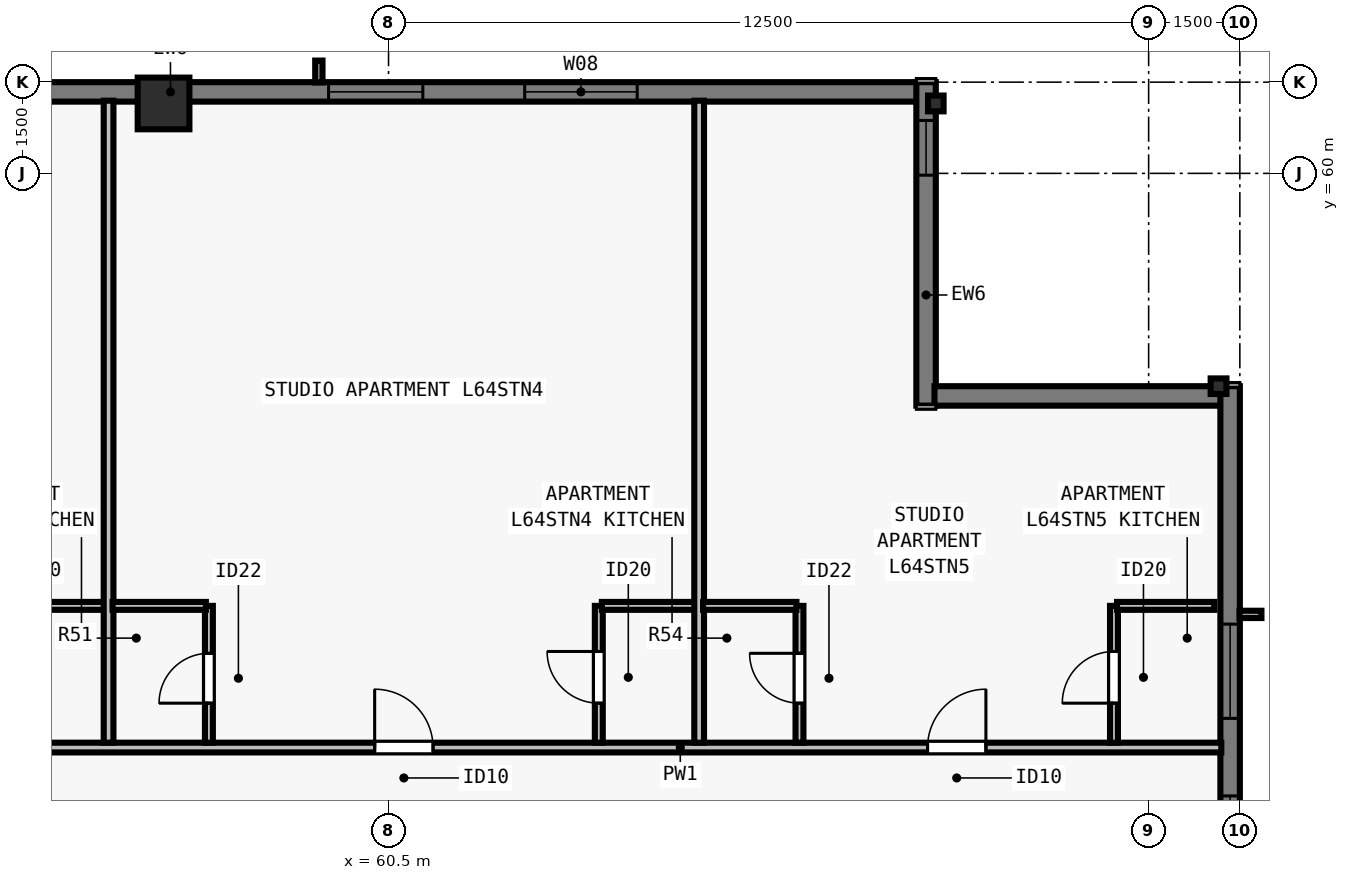
"""IFC4 building model, lengths in metres.
Left out: names, types, materials, properties, quantities, classifications, styles, units other than length and angle.
Written with IfcOpenShell. Run it as: python <this file> out.ifc"""

import sys

from ifc_helpers import new_model, si_unit, direction, frame, frame_2d, origin, origin_2d, place, context, subcontext, project, spatial, rectangle, i_section, extrude, element, fill, save


model = new_model("IFC4")
c1 = context("Model", 3, precision=1e-05, world=origin(), true_north=direction((0.0, 1.0)))
c2 = subcontext(c1, "Body", "Model", "MODEL_VIEW")
j1 = project(units=[si_unit("LENGTHUNIT", "METRE"), si_unit("PLANEANGLEUNIT", "RADIAN")], contexts=[c1])
p1 = place(None, origin())
s1 = spatial("IfcSite", under=j1, at=p1, CompositionType="ELEMENT")
p2 = place(p1, origin())
s2 = spatial("IfcBuilding", under=s1, at=p2, CompositionType="ELEMENT")
p3 = place(p2, frame((0.0, 0.0, 234.0)))
s3 = spatial("IfcBuildingStorey", under=s2, at=p3, CompositionType="ELEMENT", Elevation=234.0)
for number, where, z_axis, x_axis in (
    (1, (74.15, 56.5, 0.0), (0.0, 0.0, 1.0), (0.0, 1.0, 0.0)),
    (2, (69.5, 61.15, 0.0), (0.0, 0.0, 1.0), (1.0, 0.0, 0.0)),
):
    element("IfcColumn", number, at=place(p3, frame(where, z_axis=z_axis, x_axis=x_axis)), inside=s3, PredefinedType="COLUMN", context=c2, shape_type="SweptSolid", body=[
        extrude(i_section(OverallWidth=0.256, OverallDepth=0.26, WebThickness=0.01, FlangeThickness=0.017, FilletRadius=0.013, at=origin_2d()), origin(), (0.0, 0.0, 1.0), 3.5),
    ])
p4 = place(p3, frame((56.8, 61.15, 0.0), z_axis=(0.0, 0.0, 1.0), x_axis=(1.0, 0.0, 0.0)))
e3 = element("IfcColumn", 3, at=p4, inside=s3, PredefinedType="COLUMN", context=c2, shape_type="SweptSolid", body=[
    extrude(rectangle(XDim=0.85, YDim=0.85, at=origin_2d()), origin(), (0.0, 0.0, 1.0), 3.5),
])
p5 = place(p3, frame((34.5, 61.34, 0.0), z_axis=(0.0, 0.0, 1.0), x_axis=(1.0, 0.0, 0.0)))
e4 = element("IfcWall", 4, at=p5, inside=s3, PredefinedType="SOLIDWALL", context=c2, shape_type="SweptSolid", body=[
    extrude(rectangle(XDim=34.702, YDim=0.32, at=frame_2d((17.351, 0.0))), origin(), (0.0, 0.0, 1.0), 3.29),
])
p6 = place(p5, frame((4.763, 0.0, 0.8)))
e5 = element("IfcOpeningElement", 5, at=p6, cuts=e4, PredefinedType="OPENING", context=c2, shape_type="SweptSolid", body=[
    extrude(rectangle(XDim=1.55, YDim=1.678, at=frame_2d((0.775, 0.839))), frame((0.0, 0.17, 0.0), z_axis=(0.0, -1.0, 0.0), x_axis=(1.0, 0.0, 0.0)), (0.0, 0.0, 1.0), 0.34),
])
p7 = place(p5, frame((7.988, 0.0, 0.8)))
e6 = element("IfcOpeningElement", 6, at=p7, cuts=e4, PredefinedType="OPENING", context=c2, shape_type="SweptSolid", body=[
    extrude(rectangle(XDim=1.85, YDim=1.678, at=frame_2d((0.925, 0.839))), frame((0.0, 0.17, 0.0), z_axis=(0.0, -1.0, 0.0), x_axis=(1.0, 0.0, 0.0)), (0.0, 0.0, 1.0), 0.34),
])
p8 = place(p5, frame((10.263, 0.0, 0.8)))
e7 = element("IfcOpeningElement", 7, at=p8, cuts=e4, PredefinedType="OPENING", context=c2, shape_type="SweptSolid", body=[
    extrude(rectangle(XDim=1.55, YDim=1.678, at=frame_2d((0.775, 0.839))), frame((0.0, 0.17, 0.0), z_axis=(0.0, -1.0, 0.0), x_axis=(1.0, 0.0, 0.0)), (0.0, 0.0, 1.0), 0.34),
])
p9 = place(p5, frame((14.738, 0.0, 0.8)))
e8 = element("IfcOpeningElement", 8, at=p9, cuts=e4, PredefinedType="OPENING", context=c2, shape_type="SweptSolid", body=[
    extrude(rectangle(XDim=1.85, YDim=1.678, at=frame_2d((0.925, 0.839))), frame((0.0, 0.17, 0.0), z_axis=(0.0, -1.0, 0.0), x_axis=(1.0, 0.0, 0.0)), (0.0, 0.0, 1.0), 0.34),
])
p10 = place(p5, frame((18.264, 0.0, 0.8)))
e9 = element("IfcOpeningElement", 9, at=p10, cuts=e4, PredefinedType="OPENING", context=c2, shape_type="SweptSolid", body=[
    extrude(rectangle(XDim=1.55, YDim=1.678, at=frame_2d((0.775, 0.839))), frame((0.0, 0.17, 0.0), z_axis=(0.0, -1.0, 0.0), x_axis=(1.0, 0.0, 0.0)), (0.0, 0.0, 1.0), 0.34),
])
p11 = place(p5, frame((25.014, 0.0, 0.8)))
e10 = element("IfcOpeningElement", 10, at=p11, cuts=e4, PredefinedType="OPENING", context=c2, shape_type="SweptSolid", body=[
    extrude(rectangle(XDim=1.55, YDim=1.678, at=frame_2d((0.775, 0.839))), frame((0.0, 0.17, 0.0), z_axis=(0.0, -1.0, 0.0), x_axis=(1.0, 0.0, 0.0)), (0.0, 0.0, 1.0), 0.34),
])
p12 = place(p5, frame((28.24, 0.0, 0.8)))
e11 = element("IfcOpeningElement", 11, at=p12, cuts=e4, PredefinedType="OPENING", context=c2, shape_type="SweptSolid", body=[
    extrude(rectangle(XDim=1.85, YDim=1.678, at=frame_2d((0.925, 0.839))), frame((0.0, 0.17, 0.0), z_axis=(0.0, -1.0, 0.0), x_axis=(1.0, 0.0, 0.0)), (0.0, 0.0, 1.0), 0.34),
])
p13 = place(p3, frame((69.34, 61.5, 0.0), z_axis=(0.0, 0.0, 1.0), x_axis=(0.0, -1.0, 0.0)))
e12 = element("IfcWall", 12, at=p13, inside=s3, PredefinedType="SOLIDWALL", context=c2, shape_type="SweptSolid", body=[
    extrude(rectangle(XDim=5.32, YDim=0.32, at=frame_2d((2.66, 0.0))), origin(), (0.0, 0.0, 1.0), 3.29),
])
p14 = place(p13, frame((0.63, 0.0, 0.8)))
e13 = element("IfcOpeningElement", 13, at=p14, cuts=e12, PredefinedType="OPENING", context=c2, shape_type="SweptSolid", body=[
    extrude(rectangle(XDim=0.9, YDim=1.678, at=frame_2d((0.45, 0.839))), frame((0.0, 0.17, 0.0), z_axis=(0.0, -1.0, 0.0), x_axis=(1.0, 0.0, 0.0)), (0.0, 0.0, 1.0), 0.34),
])
p15 = place(p3, frame((69.478, 56.34, 0.0), z_axis=(0.0, 0.0, 1.0), x_axis=(1.0, 0.0, 0.0)))
e14 = element("IfcWall", 14, at=p15, inside=s3, PredefinedType="SOLIDWALL", context=c2, shape_type="SweptSolid", body=[
    extrude(rectangle(XDim=4.724, YDim=0.32, at=frame_2d((2.362, 0.0))), origin(), (0.0, 0.0, 1.0), 3.29),
])
p16 = place(p3, frame((74.34, 56.5, 0.0), z_axis=(0.0, 0.0, 1.0), x_axis=(0.0, -1.0, 0.0)))
e15 = element("IfcWall", 15, at=p16, inside=s3, PredefinedType="SOLIDWALL", context=c2, shape_type="SweptSolid", body=[
    extrude(rectangle(XDim=34.702, YDim=0.32, at=frame_2d((17.351, 0.0))), origin(), (0.0, 0.0, 1.0), 3.29),
])
p17 = place(p16, frame((3.913, 0.0, 0.8)))
e16 = element("IfcOpeningElement", 16, at=p17, cuts=e15, PredefinedType="OPENING", context=c2, shape_type="SweptSolid", body=[
    extrude(rectangle(XDim=1.55, YDim=1.678, at=frame_2d((0.775, 0.839))), frame((0.0, 0.17, 0.0), z_axis=(0.0, -1.0, 0.0), x_axis=(1.0, 0.0, 0.0)), (0.0, 0.0, 1.0), 0.34),
])
p18 = place(p16, frame((6.738, 0.0, 0.8)))
e17 = element("IfcOpeningElement", 17, at=p18, cuts=e15, PredefinedType="OPENING", context=c2, shape_type="SweptSolid", body=[
    extrude(rectangle(XDim=1.85, YDim=1.678, at=frame_2d((0.925, 0.839))), frame((0.0, 0.17, 0.0), z_axis=(0.0, -1.0, 0.0), x_axis=(1.0, 0.0, 0.0)), (0.0, 0.0, 1.0), 0.34),
])
p19 = place(p16, frame((10.263, 0.0, 0.8)))
e18 = element("IfcOpeningElement", 18, at=p19, cuts=e15, PredefinedType="OPENING", context=c2, shape_type="SweptSolid", body=[
    extrude(rectangle(XDim=1.55, YDim=1.678, at=frame_2d((0.775, 0.839))), frame((0.0, 0.17, 0.0), z_axis=(0.0, -1.0, 0.0), x_axis=(1.0, 0.0, 0.0)), (0.0, 0.0, 1.0), 0.34),
])
p20 = place(p16, frame((14.738, 0.0, 0.8)))
e19 = element("IfcOpeningElement", 19, at=p20, cuts=e15, PredefinedType="OPENING", context=c2, shape_type="SweptSolid", body=[
    extrude(rectangle(XDim=1.85, YDim=1.678, at=frame_2d((0.925, 0.839))), frame((0.0, 0.17, 0.0), z_axis=(0.0, -1.0, 0.0), x_axis=(1.0, 0.0, 0.0)), (0.0, 0.0, 1.0), 0.34),
])
p21 = place(p16, frame((18.264, 0.0, 0.8)))
e20 = element("IfcOpeningElement", 20, at=p21, cuts=e15, PredefinedType="OPENING", context=c2, shape_type="SweptSolid", body=[
    extrude(rectangle(XDim=1.55, YDim=1.678, at=frame_2d((0.775, 0.839))), frame((0.0, 0.17, 0.0), z_axis=(0.0, -1.0, 0.0), x_axis=(1.0, 0.0, 0.0)), (0.0, 0.0, 1.0), 0.34),
])
p22 = place(p16, frame((24.164, 0.0, 0.8)))
e21 = element("IfcOpeningElement", 21, at=p22, cuts=e15, PredefinedType="OPENING", context=c2, shape_type="SweptSolid", body=[
    extrude(rectangle(XDim=1.55, YDim=1.678, at=frame_2d((0.775, 0.839))), frame((0.0, 0.17, 0.0), z_axis=(0.0, -1.0, 0.0), x_axis=(1.0, 0.0, 0.0)), (0.0, 0.0, 1.0), 0.34),
])
p23 = place(p3, frame((29.77, 50.558, 0.0), z_axis=(0.0, 0.0, 1.0), x_axis=(1.0, 0.0, 0.0)))
e22 = element("IfcWall", 22, at=p23, inside=s3, PredefinedType="PARTITIONING", context=c2, shape_type="SweptSolid", body=[
    extrude(rectangle(XDim=44.425, YDim=0.16, at=frame_2d((22.212, 0.0))), origin(), (0.0, 0.0, 1.0), 2.958),
])
p24 = place(p23, frame((5.066, 0.0, 0.0)))
e23 = element("IfcOpeningElement", 23, at=p24, cuts=e22, PredefinedType="OPENING", context=c2, shape_type="SweptSolid", body=[
    extrude(rectangle(XDim=0.96, YDim=2.18, at=frame_2d((0.48, 1.09))), frame((0.0, 0.09, 0.0), z_axis=(0.0, -1.0, 0.0), x_axis=(1.0, 0.0, 0.0)), (0.0, 0.0, 1.0), 0.18),
])
p25 = place(p23, frame((12.838, 0.0, 0.0)))
e24 = element("IfcOpeningElement", 24, at=p25, cuts=e22, PredefinedType="OPENING", context=c2, shape_type="SweptSolid", body=[
    extrude(rectangle(XDim=0.96, YDim=2.18, at=frame_2d((0.48, 1.09))), frame((0.0, 0.09, 0.0), z_axis=(0.0, -1.0, 0.0), x_axis=(1.0, 0.0, 0.0)), (0.0, 0.0, 1.0), 0.18),
])
p26 = place(p23, frame((21.67, 0.0, 0.0)))
e25 = element("IfcOpeningElement", 25, at=p26, cuts=e22, PredefinedType="OPENING", context=c2, shape_type="SweptSolid", body=[
    extrude(rectangle(XDim=0.96, YDim=2.18, at=frame_2d((0.48, 1.09))), frame((0.0, 0.09, 0.0), z_axis=(0.0, -1.0, 0.0), x_axis=(1.0, 0.0, 0.0)), (0.0, 0.0, 1.0), 0.18),
])
p27 = place(p23, frame((30.502, 0.0, 0.0)))
e26 = element("IfcOpeningElement", 26, at=p27, cuts=e22, PredefinedType="OPENING", context=c2, shape_type="SweptSolid", body=[
    extrude(rectangle(XDim=0.96, YDim=2.18, at=frame_2d((0.48, 1.09))), frame((0.0, 0.09, 0.0), z_axis=(0.0, -1.0, 0.0), x_axis=(1.0, 0.0, 0.0)), (0.0, 0.0, 1.0), 0.18),
])
p28 = place(p23, frame((39.594, 0.0, 0.0)))
e27 = element("IfcOpeningElement", 27, at=p28, cuts=e22, PredefinedType="OPENING", context=c2, shape_type="SweptSolid", body=[
    extrude(rectangle(XDim=0.96, YDim=2.18, at=frame_2d((0.48, 1.09))), frame((0.0, 0.09, 0.0), z_axis=(0.0, -1.0, 0.0), x_axis=(1.0, 0.0, 0.0)), (0.0, 0.0, 1.0), 0.18),
])
p29 = place(p3, frame((54.296, 52.887, 0.0), z_axis=(0.0, 0.0, 1.0), x_axis=(1.0, 0.0, 0.0)))
e28 = element("IfcWall", 28, at=p29, inside=s3, PredefinedType="PLUMBINGWALL", context=c2, shape_type="SweptSolid", body=[
    extrude(rectangle(XDim=1.6, YDim=0.13, at=frame_2d((0.8, 0.0))), origin(), (0.0, 0.0, 1.0), 3.29),
])
p30 = place(p3, frame((55.896, 50.637, 0.0), z_axis=(0.0, 0.0, 1.0), x_axis=(0.0, 1.0, 0.0)))
e29 = element("IfcWall", 29, at=p30, inside=s3, PredefinedType="PARTITIONING", context=c2, shape_type="SweptSolid", body=[
    extrude(rectangle(XDim=10.558, YDim=0.16, at=frame_2d((5.279, 0.0))), origin(), (0.0, 0.0, 1.0), 2.958),
])
p31 = place(p3, frame((57.546, 50.637, 0.0), z_axis=(0.0, 0.0, 1.0), x_axis=(0.0, 1.0, 0.0)))
e30 = element("IfcWall", 30, at=p31, inside=s3, PredefinedType="PLUMBINGWALL", context=c2, shape_type="SweptSolid", body=[
    extrude(rectangle(XDim=2.25, YDim=0.13, at=frame_2d((1.125, 0.0))), origin(), (0.0, 0.0, 1.0), 3.29),
])
p32 = place(p31, frame((0.65, 0.0, 0.0)))
e31 = element("IfcOpeningElement", 31, at=p32, cuts=e30, PredefinedType="OPENING", context=c2, shape_type="SweptSolid", body=[
    extrude(rectangle(XDim=0.82, YDim=2.1, at=frame_2d((0.41, 1.05))), frame((0.0, 0.075, 0.0), z_axis=(0.0, -1.0, 0.0), x_axis=(1.0, 0.0, 0.0)), (0.0, 0.0, 1.0), 0.15),
])
p33 = place(p3, frame((55.961, 52.887, 0.0), z_axis=(0.0, 0.0, 1.0), x_axis=(1.0, 0.0, 0.0)))
e32 = element("IfcWall", 32, at=p33, inside=s3, PredefinedType="PLUMBINGWALL", context=c2, shape_type="SweptSolid", body=[
    extrude(rectangle(XDim=1.535, YDim=0.13, at=frame_2d((0.768, 0.0))), origin(), (0.0, 0.0, 1.0), 3.29),
])
p34 = place(p3, frame((63.958, 50.637, 0.0), z_axis=(0.0, 0.0, 1.0), x_axis=(0.0, 1.0, 0.0)))
e33 = element("IfcWall", 33, at=p34, inside=s3, PredefinedType="PLUMBINGWALL", context=c2, shape_type="SweptSolid", body=[
    extrude(rectangle(XDim=2.25, YDim=0.13, at=frame_2d((1.125, 0.0))), origin(), (0.0, 0.0, 1.0), 2.573),
])
p35 = place(p34, frame((0.65, 0.0, 0.0)))
e34 = element("IfcOpeningElement", 34, at=p35, cuts=e33, PredefinedType="OPENING", context=c2, shape_type="SweptSolid", body=[
    extrude(rectangle(XDim=0.85, YDim=2.1, at=frame_2d((0.425, 1.05))), frame((0.0, 0.075, 0.0), z_axis=(0.0, -1.0, 0.0), x_axis=(1.0, 0.0, 0.0)), (0.0, 0.0, 1.0), 0.15),
])
p36 = place(p3, frame((64.008, 52.887, 0.0), z_axis=(0.0, 0.0, 1.0), x_axis=(1.0, 0.0, 0.0)))
e35 = element("IfcWall", 35, at=p36, inside=s3, PredefinedType="PLUMBINGWALL", context=c2, shape_type="SweptSolid", body=[
    extrude(rectangle(XDim=1.6, YDim=0.13, at=frame_2d((0.8, 0.0))), origin(), (0.0, 0.0, 1.0), 3.29),
])
p37 = place(p3, frame((65.608, 50.637, 0.0), z_axis=(0.0, 0.0, 1.0), x_axis=(0.0, 1.0, 0.0)))
e36 = element("IfcWall", 36, at=p37, inside=s3, PredefinedType="PARTITIONING", context=c2, shape_type="SweptSolid", body=[
    extrude(rectangle(XDim=10.558, YDim=0.16, at=frame_2d((5.279, 0.0))), origin(), (0.0, 0.0, 1.0), 2.573),
])
p38 = place(p3, frame((67.258, 50.637, 0.0), z_axis=(0.0, 0.0, 1.0), x_axis=(0.0, 1.0, 0.0)))
e37 = element("IfcWall", 37, at=p38, inside=s3, PredefinedType="PLUMBINGWALL", context=c2, shape_type="SweptSolid", body=[
    extrude(rectangle(XDim=2.25, YDim=0.13, at=frame_2d((1.125, 0.0))), origin(), (0.0, 0.0, 1.0), 3.29),
])
p39 = place(p38, frame((0.65, 0.0, 0.0)))
e38 = element("IfcOpeningElement", 38, at=p39, cuts=e37, PredefinedType="OPENING", context=c2, shape_type="SweptSolid", body=[
    extrude(rectangle(XDim=0.82, YDim=2.1, at=frame_2d((0.41, 1.05))), frame((0.0, 0.075, 0.0), z_axis=(0.0, -1.0, 0.0), x_axis=(1.0, 0.0, 0.0)), (0.0, 0.0, 1.0), 0.15),
])
p40 = place(p3, frame((65.673, 52.887, 0.0), z_axis=(0.0, 0.0, 1.0), x_axis=(1.0, 0.0, 0.0)))
e39 = element("IfcWall", 39, at=p40, inside=s3, PredefinedType="PLUMBINGWALL", context=c2, shape_type="SweptSolid", body=[
    extrude(rectangle(XDim=1.535, YDim=0.13, at=frame_2d((0.768, 0.0))), origin(), (0.0, 0.0, 1.0), 3.29),
])
p41 = place(p3, frame((72.43, 50.637, 0.0), z_axis=(0.0, 0.0, 1.0), x_axis=(0.0, 1.0, 0.0)))
e40 = element("IfcWall", 40, at=p41, inside=s3, PredefinedType="PLUMBINGWALL", context=c2, shape_type="SweptSolid", body=[
    extrude(rectangle(XDim=2.25, YDim=0.13, at=frame_2d((1.125, 0.0))), origin(), (0.0, 0.0, 1.0), 3.29),
])
p42 = place(p41, frame((0.65, 0.0, 0.0)))
e41 = element("IfcOpeningElement", 41, at=p42, cuts=e40, PredefinedType="OPENING", context=c2, shape_type="SweptSolid", body=[
    extrude(rectangle(XDim=0.85, YDim=2.1, at=frame_2d((0.425, 1.05))), frame((0.0, 0.075, 0.0), z_axis=(0.0, -1.0, 0.0), x_axis=(1.0, 0.0, 0.0)), (0.0, 0.0, 1.0), 0.15),
])
p43 = place(p3, frame((72.48, 52.887, 0.0), z_axis=(0.0, 0.0, 1.0), x_axis=(1.0, 0.0, 0.0)))
e42 = element("IfcWall", 42, at=p43, inside=s3, PredefinedType="PLUMBINGWALL", context=c2, shape_type="SweptSolid", body=[
    extrude(rectangle(XDim=1.6, YDim=0.13, at=frame_2d((0.8, 0.0))), origin(), (0.0, 0.0, 1.0), 3.29),
])
p44 = place(p11, origin())
e43 = element("IfcWindow", 43, at=p44, inside=s3, PartitioningType="SINGLE_PANEL", PredefinedType="WINDOW", context=c2, shape_type="SweptSolid", body=[
    extrude(rectangle(XDim=1.55, YDim=1.678, at=frame_2d((0.775, 0.839))), frame((0.0, -0.05, 0.0), z_axis=(0.0, -1.0, 0.0), x_axis=(1.0, 0.0, 0.0)), (0.0, 0.0, 1.0), 0.06),
])
fill(e10, e43)
p45 = place(p12, origin())
e44 = element("IfcWindow", 44, at=p45, inside=s3, PartitioningType="SINGLE_PANEL", PredefinedType="WINDOW", context=c2, shape_type="SweptSolid", body=[
    extrude(rectangle(XDim=1.85, YDim=1.678, at=frame_2d((0.925, 0.839))), frame((0.0, -0.05, 0.0), z_axis=(0.0, -1.0, 0.0), x_axis=(1.0, 0.0, 0.0)), (0.0, 0.0, 1.0), 0.06),
])
fill(e11, e44)
p46 = place(p17, origin())
e45 = element("IfcWindow", 45, at=p46, inside=s3, PartitioningType="SINGLE_PANEL", PredefinedType="WINDOW", context=c2, shape_type="SweptSolid", body=[
    extrude(rectangle(XDim=1.55, YDim=1.678, at=frame_2d((0.775, 0.839))), frame((0.0, -0.05, 0.0), z_axis=(0.0, -1.0, 0.0), x_axis=(1.0, 0.0, 0.0)), (0.0, 0.0, 1.0), 0.06),
])
fill(e16, e45)
p47 = place(p18, origin())
e46 = element("IfcWindow", 46, at=p47, inside=s3, PartitioningType="SINGLE_PANEL", PredefinedType="WINDOW", context=c2, shape_type="SweptSolid", body=[
    extrude(rectangle(XDim=1.85, YDim=1.678, at=frame_2d((0.925, 0.839))), frame((0.0, -0.05, 0.0), z_axis=(0.0, -1.0, 0.0), x_axis=(1.0, 0.0, 0.0)), (0.0, 0.0, 1.0), 0.06),
])
fill(e17, e46)
p48 = place(p14, origin())
e47 = element("IfcWindow", 47, at=p48, inside=s3, PartitioningType="SINGLE_PANEL", PredefinedType="WINDOW", context=c2, shape_type="SweptSolid", body=[
    extrude(rectangle(XDim=0.9, YDim=1.678, at=frame_2d((0.45, 0.839))), frame((0.0, -0.04, 0.0), z_axis=(0.0, -1.0, 0.0), x_axis=(1.0, 0.0, 0.0)), (0.0, 0.0, 1.0), 0.06),
])
fill(e13, e47)
p49 = place(p32, origin())
e48 = element("IfcDoor", 48, at=p49, inside=s3, OperationType="SINGLE_SWING_LEFT", PredefinedType="DOOR", context=c2, shape_type="SweptSolid", body=[
    extrude(rectangle(XDim=0.82, YDim=2.1, at=frame_2d((0.41, 1.05))), frame((0.0, 0.025, 0.0), z_axis=(0.0, -1.0, 0.0), x_axis=(1.0, 0.0, 0.0)), (0.0, 0.0, 1.0), 0.05),
])
fill(e31, e48)
p50 = place(p35, origin())
e49 = element("IfcDoor", 49, at=p50, inside=s3, OperationType="SINGLE_SWING_RIGHT", PredefinedType="DOOR", context=c2, shape_type="SweptSolid", body=[
    extrude(rectangle(XDim=0.85, YDim=2.1, at=frame_2d((0.425, 1.05))), frame((0.0, 0.025, 0.0), z_axis=(0.0, -1.0, 0.0), x_axis=(1.0, 0.0, 0.0)), (0.0, 0.0, 1.0), 0.05),
])
fill(e34, e49)
p51 = place(p27, origin())
e50 = element("IfcDoor", 50, at=p51, inside=s3, OperationType="SINGLE_SWING_LEFT", PredefinedType="DOOR", context=c2, shape_type="SweptSolid", body=[
    extrude(rectangle(XDim=0.96, YDim=2.18, at=frame_2d((0.48, 1.09))), frame((0.0, 0.025, 0.0), z_axis=(0.0, -1.0, 0.0), x_axis=(1.0, 0.0, 0.0)), (0.0, 0.0, 1.0), 0.05),
])
fill(e26, e50)
p52 = place(p39, origin())
e51 = element("IfcDoor", 51, at=p52, inside=s3, OperationType="SINGLE_SWING_RIGHT", PredefinedType="DOOR", context=c2, shape_type="SweptSolid", body=[
    extrude(rectangle(XDim=0.82, YDim=2.1, at=frame_2d((0.41, 1.05))), frame((0.0, 0.025, 0.0), z_axis=(0.0, -1.0, 0.0), x_axis=(1.0, 0.0, 0.0)), (0.0, 0.0, 1.0), 0.05),
])
fill(e38, e51)
p53 = place(p42, origin())
e52 = element("IfcDoor", 52, at=p53, inside=s3, OperationType="SINGLE_SWING_LEFT", PredefinedType="DOOR", context=c2, shape_type="SweptSolid", body=[
    extrude(rectangle(XDim=0.85, YDim=2.1, at=frame_2d((0.425, 1.05))), frame((0.0, 0.025, 0.0), z_axis=(0.0, -1.0, 0.0), x_axis=(1.0, 0.0, 0.0)), (0.0, 0.0, 1.0), 0.05),
])
fill(e41, e52)
p54 = place(p28, origin())
e53 = element("IfcDoor", 53, at=p54, inside=s3, OperationType="SINGLE_SWING_RIGHT", PredefinedType="DOOR", context=c2, shape_type="SweptSolid", body=[
    extrude(rectangle(XDim=0.96, YDim=2.18, at=frame_2d((0.48, 1.09))), frame((0.0, 0.025, 0.0), z_axis=(0.0, -1.0, 0.0), x_axis=(1.0, 0.0, 0.0)), (0.0, 0.0, 1.0), 0.05),
])
fill(e27, e53)
save(model, sys.argv[1])
